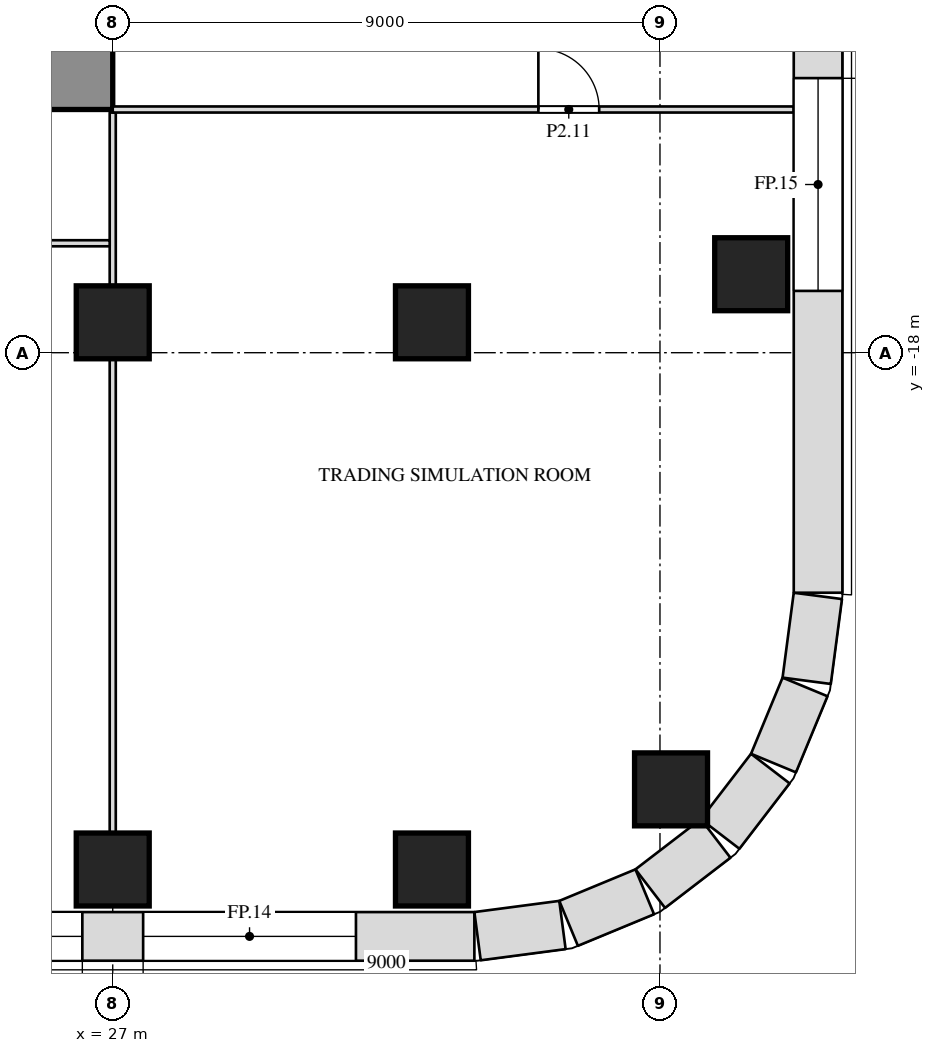
"""IFC4 building model, lengths in metres.
Left out: names, types, materials, properties, quantities, classifications, styles, units other than length and angle.
Written with IfcOpenShell. Run it as: python <this file> out.ifc"""

import sys

from ifc_helpers import new_model, si_unit, direction, frame, frame_2d, origin, origin_2d, place, context, subcontext, project, spatial, rectangle, extrude, element, fill, save


model = new_model("IFC4")
c1 = context("Model", 3, precision=1e-05, world=origin(), true_north=direction((0.0, 1.0)))
c2 = subcontext(c1, "Body", "Model", "MODEL_VIEW")
j1 = project(units=[si_unit("LENGTHUNIT", "METRE"), si_unit("PLANEANGLEUNIT", "RADIAN")], contexts=[c1])
p1 = place(None, origin())
s1 = spatial("IfcSite", under=j1, at=p1, CompositionType="ELEMENT")
p2 = place(p1, origin())
s2 = spatial("IfcBuilding", under=s1, at=p2, CompositionType="ELEMENT")
p3 = place(p2, frame((0.0, 0.0, 15.0)))
s3 = spatial("IfcBuildingStorey", under=s2, at=p3, CompositionType="ELEMENT", Elevation=15.0)
for number, where, z_axis, x_axis in (
    (1, (27.0, -26.5, 0.0), (0.0, 0.0, 1.0), (1.0, 0.0, 0.0)),
    (2, (32.25, -26.5, 0.0), (0.0, 0.0, 1.0), (1.0, 0.0, 0.0)),
    (3, (36.182, -25.182, 0.0), (0.0, 0.0, 1.0), (1.0, 0.0, 0.0)),
    (4, (27.0, -17.5, 0.0), (0.0, 0.0, 1.0), (1.0, 0.0, 0.0)),
    (5, (32.25, -17.5, 0.0), (0.0, 0.0, 1.0), (1.0, 0.0, 0.0)),
    (6, (37.5, -16.709, 0.0), (0.0, 0.0, 1.0), (1.0, 0.0, 0.0)),
):
    element("IfcColumn", number, at=place(p3, frame(where, z_axis=z_axis, x_axis=x_axis)), inside=s3, PredefinedType="COLUMN", context=c2, shape_type="SweptSolid", body=[
        extrude(rectangle(XDim=1.2, YDim=1.2, at=origin_2d()), origin(), (0.0, 0.0, 1.0), 6.0),
    ])
p4 = place(p3, frame((-27.0, -13.4, 0.0), z_axis=(0.0, 0.0, 1.0), x_axis=(1.0, 0.0, 0.0)))
e7 = element("IfcWall", 7, at=p4, inside=s3, PredefinedType="SHEAR", context=c2, shape_type="SweptSolid", body=[
    extrude(rectangle(XDim=54.0, YDim=1.2, at=frame_2d((27.0, 0.0))), origin(), (0.0, 0.0, 1.0), 5.7),
])
p5 = place(p4, frame((16.45, 0.0, 0.0)))
e8 = element("IfcOpeningElement", 8, at=p5, cuts=e7, PredefinedType="OPENING", context=c2, shape_type="SweptSolid", body=[
    extrude(rectangle(XDim=1.0, YDim=2.1, at=frame_2d((0.5, 1.05))), frame((0.0, 0.612, 0.0), z_axis=(0.0, -1.0, 0.0), x_axis=(1.0, 0.0, 0.0)), (0.0, 0.0, 1.0), 1.224),
])
p6 = place(p4, frame((36.55, 0.0, 0.0)))
e9 = element("IfcOpeningElement", 9, at=p6, cuts=e7, PredefinedType="OPENING", context=c2, shape_type="SweptSolid", body=[
    extrude(rectangle(XDim=1.0, YDim=2.1, at=frame_2d((0.5, 1.05))), frame((0.0, 0.612, 0.0), z_axis=(0.0, -1.0, 0.0), x_axis=(1.0, 0.0, 0.0)), (0.0, 0.0, 1.0), 1.224),
])
p7 = place(p3, frame((27.0, -25.9, 0.0), z_axis=(0.0, 0.0, 1.0), x_axis=(0.0, 1.0, 0.0)))
e10 = element("IfcWall", 10, at=p7, inside=s3, PredefinedType="PARTITIONING", context=c2, shape_type="SweptSolid", body=[
    extrude(rectangle(XDim=7.8, YDim=0.1, at=frame_2d((3.9, 0.0))), origin(), (0.0, 0.0, 1.0), 5.088),
])
p8 = place(p3, frame((27.0, -16.9, 0.0), z_axis=(0.0, 0.0, 1.0), x_axis=(0.0, 1.0, 0.0)))
e11 = element("IfcWall", 11, at=p8, inside=s3, PredefinedType="PARTITIONING", context=c2, shape_type="SweptSolid", body=[
    extrude(rectangle(XDim=2.85, YDim=0.1, at=frame_2d((1.425, 0.0))), origin(), (0.0, 0.0, 1.0), 5.088),
])
p9 = place(p3, frame((-26.95, -16.2, 0.0), z_axis=(0.0, 0.0, 1.0), x_axis=(1.0, 0.0, 0.0)))
e12 = element("IfcWall", 12, at=p9, inside=s3, PredefinedType="PARTITIONING", context=c2, shape_type="SweptSolid", body=[
    extrude(rectangle(XDim=53.9, YDim=0.1, at=frame_2d((26.95, 0.0))), origin(), (0.0, 0.0, 1.0), 5.7),
])
p10 = place(p9, frame((6.2, 0.0, 0.0)))
e13 = element("IfcOpeningElement", 13, at=p10, cuts=e12, PredefinedType="OPENING", context=c2, shape_type="SweptSolid", body=[
    extrude(rectangle(XDim=1.0, YDim=2.1, at=frame_2d((0.5, 1.05))), frame((0.0, 0.062, 0.0), z_axis=(0.0, -1.0, 0.0), x_axis=(1.0, 0.0, 0.0)), (0.0, 0.0, 1.0), 0.124),
])
p11 = place(p9, frame((15.2, 0.0, 0.0)))
e14 = element("IfcOpeningElement", 14, at=p11, cuts=e12, PredefinedType="OPENING", context=c2, shape_type="SweptSolid", body=[
    extrude(rectangle(XDim=1.0, YDim=2.1, at=frame_2d((0.5, 1.05))), frame((0.0, 0.062, 0.0), z_axis=(0.0, -1.0, 0.0), x_axis=(1.0, 0.0, 0.0)), (0.0, 0.0, 1.0), 0.124),
])
p12 = place(p9, frame((21.95, 0.0, 0.0)))
e15 = element("IfcOpeningElement", 15, at=p12, cuts=e12, PredefinedType="OPENING", context=c2, shape_type="SweptSolid", body=[
    extrude(rectangle(XDim=1.0, YDim=2.1, at=frame_2d((0.5, 1.05))), frame((0.0, 0.062, 0.0), z_axis=(0.0, -1.0, 0.0), x_axis=(1.0, 0.0, 0.0)), (0.0, 0.0, 1.0), 0.124),
])
p13 = place(p9, frame((30.95, 0.0, 0.0)))
e16 = element("IfcOpeningElement", 16, at=p13, cuts=e12, PredefinedType="OPENING", context=c2, shape_type="SweptSolid", body=[
    extrude(rectangle(XDim=1.0, YDim=2.1, at=frame_2d((0.5, 1.05))), frame((0.0, 0.062, 0.0), z_axis=(0.0, -1.0, 0.0), x_axis=(1.0, 0.0, 0.0)), (0.0, 0.0, 1.0), 0.124),
])
p14 = place(p9, frame((39.95, 0.0, 0.0)))
e17 = element("IfcOpeningElement", 17, at=p14, cuts=e12, PredefinedType="OPENING", context=c2, shape_type="SweptSolid", body=[
    extrude(rectangle(XDim=1.0, YDim=2.1, at=frame_2d((0.5, 1.05))), frame((0.0, 0.062, 0.0), z_axis=(0.0, -1.0, 0.0), x_axis=(1.0, 0.0, 0.0)), (0.0, 0.0, 1.0), 0.124),
])
p15 = place(p9, frame((48.95, 0.0, 0.0)))
e18 = element("IfcOpeningElement", 18, at=p15, cuts=e12, PredefinedType="OPENING", context=c2, shape_type="SweptSolid", body=[
    extrude(rectangle(XDim=1.0, YDim=2.1, at=frame_2d((0.5, 1.05))), frame((0.0, 0.062, 0.0), z_axis=(0.0, -1.0, 0.0), x_axis=(1.0, 0.0, 0.0)), (0.0, 0.0, 1.0), 0.124),
])
p16 = place(p3, frame((27.0, -14.0, 0.0), z_axis=(0.0, 0.0, 1.0), x_axis=(1.0, 0.0, 0.0)))
e19 = element("IfcWall", 19, at=p16, inside=s3, PredefinedType="PARTITIONING", context=c2, shape_type="SweptSolid", body=[
    extrude(rectangle(XDim=11.2, YDim=0.1, at=frame_2d((5.6, 0.0))), origin(), (0.0, 0.0, 1.0), 5.7),
])
p17 = place(p16, frame((7.0, 0.0, 0.0)))
e20 = element("IfcOpeningElement", 20, at=p17, cuts=e19, PredefinedType="OPENING", context=c2, shape_type="SweptSolid", body=[
    extrude(rectangle(XDim=1.0, YDim=2.1, at=frame_2d((0.5, 1.05))), frame((0.0, 0.062, 0.0), z_axis=(0.0, -1.0, 0.0), x_axis=(1.0, 0.0, 0.0)), (0.0, 0.0, 1.0), 0.124),
])
p18 = place(p3, frame((-32.948, -27.6, 0.0), z_axis=(0.0, 0.0, 1.0), x_axis=(1.0, 0.0, 0.0)))
e21 = element("IfcWall", 21, at=p18, inside=s3, PredefinedType="SOLIDWALL", context=c2, shape_type="SweptSolid", body=[
    extrude(rectangle(XDim=65.895, YDim=0.8, at=frame_2d((32.948, 0.0))), origin(), (0.0, 0.0, 1.0), 5.7),
])
p19 = place(p18, frame((1.948, 0.0, 1.0)))
e22 = element("IfcOpeningElement", 22, at=p19, cuts=e21, PredefinedType="OPENING", context=c2, shape_type="SweptSolid", body=[
    extrude(rectangle(XDim=3.5, YDim=4.0, at=frame_2d((1.75, 2.0))), frame((0.0, 0.412, 0.0), z_axis=(0.0, -1.0, 0.0), x_axis=(1.0, 0.0, 0.0)), (0.0, 0.0, 1.0), 0.824),
])
p20 = place(p18, frame((6.448, 0.0, 1.0)))
e23 = element("IfcOpeningElement", 23, at=p20, cuts=e21, PredefinedType="OPENING", context=c2, shape_type="SweptSolid", body=[
    extrude(rectangle(XDim=3.5, YDim=4.0, at=frame_2d((1.75, 2.0))), frame((0.0, 0.412, 0.0), z_axis=(0.0, -1.0, 0.0), x_axis=(1.0, 0.0, 0.0)), (0.0, 0.0, 1.0), 0.824),
])
p21 = place(p18, frame((10.948, 0.0, 1.0)))
e24 = element("IfcOpeningElement", 24, at=p21, cuts=e21, PredefinedType="OPENING", context=c2, shape_type="SweptSolid", body=[
    extrude(rectangle(XDim=3.5, YDim=4.0, at=frame_2d((1.75, 2.0))), frame((0.0, 0.412, 0.0), z_axis=(0.0, -1.0, 0.0), x_axis=(1.0, 0.0, 0.0)), (0.0, 0.0, 1.0), 0.824),
])
p22 = place(p18, frame((15.448, 0.0, 1.0)))
e25 = element("IfcOpeningElement", 25, at=p22, cuts=e21, PredefinedType="OPENING", context=c2, shape_type="SweptSolid", body=[
    extrude(rectangle(XDim=3.5, YDim=4.0, at=frame_2d((1.75, 2.0))), frame((0.0, 0.412, 0.0), z_axis=(0.0, -1.0, 0.0), x_axis=(1.0, 0.0, 0.0)), (0.0, 0.0, 1.0), 0.824),
])
p23 = place(p18, frame((19.948, 0.0, 1.0)))
e26 = element("IfcOpeningElement", 26, at=p23, cuts=e21, PredefinedType="OPENING", context=c2, shape_type="SweptSolid", body=[
    extrude(rectangle(XDim=3.5, YDim=4.0, at=frame_2d((1.75, 2.0))), frame((0.0, 0.412, 0.0), z_axis=(0.0, -1.0, 0.0), x_axis=(1.0, 0.0, 0.0)), (0.0, 0.0, 1.0), 0.824),
])
p24 = place(p18, frame((24.448, 0.0, 1.0)))
e27 = element("IfcOpeningElement", 27, at=p24, cuts=e21, PredefinedType="OPENING", context=c2, shape_type="SweptSolid", body=[
    extrude(rectangle(XDim=3.5, YDim=4.0, at=frame_2d((1.75, 2.0))), frame((0.0, 0.412, 0.0), z_axis=(0.0, -1.0, 0.0), x_axis=(1.0, 0.0, 0.0)), (0.0, 0.0, 1.0), 0.824),
])
p25 = place(p18, frame((28.948, 0.0, 1.0)))
e28 = element("IfcOpeningElement", 28, at=p25, cuts=e21, PredefinedType="OPENING", context=c2, shape_type="SweptSolid", body=[
    extrude(rectangle(XDim=3.5, YDim=4.0, at=frame_2d((1.75, 2.0))), frame((0.0, 0.412, 0.0), z_axis=(0.0, -1.0, 0.0), x_axis=(1.0, 0.0, 0.0)), (0.0, 0.0, 1.0), 0.824),
])
p26 = place(p18, frame((33.448, 0.0, 1.0)))
e29 = element("IfcOpeningElement", 29, at=p26, cuts=e21, PredefinedType="OPENING", context=c2, shape_type="SweptSolid", body=[
    extrude(rectangle(XDim=3.5, YDim=4.0, at=frame_2d((1.75, 2.0))), frame((0.0, 0.412, 0.0), z_axis=(0.0, -1.0, 0.0), x_axis=(1.0, 0.0, 0.0)), (0.0, 0.0, 1.0), 0.824),
])
p27 = place(p18, frame((37.948, 0.0, 1.0)))
e30 = element("IfcOpeningElement", 30, at=p27, cuts=e21, PredefinedType="OPENING", context=c2, shape_type="SweptSolid", body=[
    extrude(rectangle(XDim=3.5, YDim=4.0, at=frame_2d((1.75, 2.0))), frame((0.0, 0.412, 0.0), z_axis=(0.0, -1.0, 0.0), x_axis=(1.0, 0.0, 0.0)), (0.0, 0.0, 1.0), 0.824),
])
p28 = place(p18, frame((42.448, 0.0, 1.0)))
e31 = element("IfcOpeningElement", 31, at=p28, cuts=e21, PredefinedType="OPENING", context=c2, shape_type="SweptSolid", body=[
    extrude(rectangle(XDim=3.5, YDim=4.0, at=frame_2d((1.75, 2.0))), frame((0.0, 0.412, 0.0), z_axis=(0.0, -1.0, 0.0), x_axis=(1.0, 0.0, 0.0)), (0.0, 0.0, 1.0), 0.824),
])
p29 = place(p18, frame((46.948, 0.0, 1.0)))
e32 = element("IfcOpeningElement", 32, at=p29, cuts=e21, PredefinedType="OPENING", context=c2, shape_type="SweptSolid", body=[
    extrude(rectangle(XDim=3.5, YDim=4.0, at=frame_2d((1.75, 2.0))), frame((0.0, 0.412, 0.0), z_axis=(0.0, -1.0, 0.0), x_axis=(1.0, 0.0, 0.0)), (0.0, 0.0, 1.0), 0.824),
])
p30 = place(p18, frame((51.448, 0.0, 1.0)))
e33 = element("IfcOpeningElement", 33, at=p30, cuts=e21, PredefinedType="OPENING", context=c2, shape_type="SweptSolid", body=[
    extrude(rectangle(XDim=3.5, YDim=4.0, at=frame_2d((1.75, 2.0))), frame((0.0, 0.412, 0.0), z_axis=(0.0, -1.0, 0.0), x_axis=(1.0, 0.0, 0.0)), (0.0, 0.0, 1.0), 0.824),
])
p31 = place(p18, frame((55.948, 0.0, 1.0)))
e34 = element("IfcOpeningElement", 34, at=p31, cuts=e21, PredefinedType="OPENING", context=c2, shape_type="SweptSolid", body=[
    extrude(rectangle(XDim=3.5, YDim=4.0, at=frame_2d((1.75, 2.0))), frame((0.0, 0.412, 0.0), z_axis=(0.0, -1.0, 0.0), x_axis=(1.0, 0.0, 0.0)), (0.0, 0.0, 1.0), 0.824),
])
p32 = place(p18, frame((60.448, 0.0, 1.0)))
e35 = element("IfcOpeningElement", 35, at=p32, cuts=e21, PredefinedType="OPENING", context=c2, shape_type="SweptSolid", body=[
    extrude(rectangle(XDim=3.5, YDim=4.0, at=frame_2d((1.75, 2.0))), frame((0.0, 0.412, 0.0), z_axis=(0.0, -1.0, 0.0), x_axis=(1.0, 0.0, 0.0)), (0.0, 0.0, 1.0), 0.824),
])
p33 = place(p3, frame((33.0, -27.597, 0.0), z_axis=(0.0, 0.0, 1.0), x_axis=(0.99144603414, 0.130517283865, 0.0)))
e36 = element("IfcWall", 36, at=p33, inside=s3, PredefinedType="SOLIDWALL", context=c2, shape_type="SweptSolid", body=[
    extrude(rectangle(XDim=1.408, YDim=0.8, at=frame_2d((0.704, 0.0))), origin(), (0.0, 0.0, 1.0), 5.7),
])
p34 = place(p3, frame((34.497, -27.386, 0.0), z_axis=(0.0, 0.0, 1.0), x_axis=(0.923847774587, 0.38276009378, 0.0)))
e37 = element("IfcWall", 37, at=p34, inside=s3, PredefinedType="SOLIDWALL", context=c2, shape_type="SweptSolid", body=[
    extrude(rectangle(XDim=1.355, YDim=0.8, at=frame_2d((0.678, 0.0))), origin(), (0.0, 0.0, 1.0), 5.7),
])
for number, where, z_axis, x_axis in (
    (38, (35.84, -26.815, 0.0), (0.0, 0.0, 1.0), (0.793, 0.609, 0.0)),
    (39, (36.989, -25.916, 0.0), (0.0, 0.0, 1.0), (0.609, 0.793, 0.0)),
):
    element("IfcWall", number, at=place(p3, frame(where, z_axis=z_axis, x_axis=x_axis)), inside=s3, PredefinedType="SOLIDWALL", context=c2, shape_type="SweptSolid", body=[
        extrude(rectangle(XDim=1.356, YDim=0.8, at=frame_2d((0.678, 0.0))), origin(), (0.0, 0.0, 1.0), 5.7),
    ])
p35 = place(p3, frame((37.867, -24.75, 0.0), z_axis=(0.0, 0.0, 1.0), x_axis=(0.38276009378, 0.923847774587, 0.0)))
e40 = element("IfcWall", 40, at=p35, inside=s3, PredefinedType="SOLIDWALL", context=c2, shape_type="SweptSolid", body=[
    extrude(rectangle(XDim=1.355, YDim=0.8, at=frame_2d((0.678, 0.0))), origin(), (0.0, 0.0, 1.0), 5.7),
])
p36 = place(p3, frame((38.413, -23.396, 0.0), z_axis=(0.0, 0.0, 1.0), x_axis=(0.130517283865, 0.99144603414, 0.0)))
e41 = element("IfcWall", 41, at=p36, inside=s3, PredefinedType="SOLIDWALL", context=c2, shape_type="SweptSolid", body=[
    extrude(rectangle(XDim=1.408, YDim=0.8, at=frame_2d((0.704, 0.0))), origin(), (0.0, 0.0, 1.0), 5.7),
])
p37 = place(p3, frame((38.6, -21.948, 0.0), z_axis=(0.0, 0.0, 1.0), x_axis=(0.0, 1.0, 0.0)))
e42 = element("IfcWall", 42, at=p37, inside=s3, PredefinedType="SOLIDWALL", context=c2, shape_type="SweptSolid", body=[
    extrude(rectangle(XDim=35.895, YDim=0.8, at=frame_2d((17.948, 0.0))), origin(), (0.0, 0.0, 1.0), 5.7),
])
p38 = place(p37, frame((4.964, 0.0, 1.0)))
e43 = element("IfcOpeningElement", 43, at=p38, cuts=e42, PredefinedType="OPENING", context=c2, shape_type="SweptSolid", body=[
    extrude(rectangle(XDim=3.5, YDim=4.0, at=frame_2d((1.75, 2.0))), frame((0.0, 0.412, 0.0), z_axis=(0.0, -1.0, 0.0), x_axis=(1.0, 0.0, 0.0)), (0.0, 0.0, 1.0), 0.824),
])
p39 = place(p37, frame((9.458, 0.0, 1.0)))
e44 = element("IfcOpeningElement", 44, at=p39, cuts=e42, PredefinedType="OPENING", context=c2, shape_type="SweptSolid", body=[
    extrude(rectangle(XDim=3.5, YDim=4.0, at=frame_2d((1.75, 2.0))), frame((0.0, 0.412, 0.0), z_axis=(0.0, -1.0, 0.0), x_axis=(1.0, 0.0, 0.0)), (0.0, 0.0, 1.0), 0.824),
])
p40 = place(p37, frame((13.951, 0.0, 1.0)))
e45 = element("IfcOpeningElement", 45, at=p40, cuts=e42, PredefinedType="OPENING", context=c2, shape_type="SweptSolid", body=[
    extrude(rectangle(XDim=3.5, YDim=4.0, at=frame_2d((1.75, 2.0))), frame((0.0, 0.412, 0.0), z_axis=(0.0, -1.0, 0.0), x_axis=(1.0, 0.0, 0.0)), (0.0, 0.0, 1.0), 0.824),
])
p41 = place(p37, frame((18.444, 0.0, 1.0)))
e46 = element("IfcOpeningElement", 46, at=p41, cuts=e42, PredefinedType="OPENING", context=c2, shape_type="SweptSolid", body=[
    extrude(rectangle(XDim=3.5, YDim=4.0, at=frame_2d((1.75, 2.0))), frame((0.0, 0.412, 0.0), z_axis=(0.0, -1.0, 0.0), x_axis=(1.0, 0.0, 0.0)), (0.0, 0.0, 1.0), 0.824),
])
p42 = place(p37, frame((22.938, 0.0, 1.0)))
e47 = element("IfcOpeningElement", 47, at=p42, cuts=e42, PredefinedType="OPENING", context=c2, shape_type="SweptSolid", body=[
    extrude(rectangle(XDim=3.5, YDim=4.0, at=frame_2d((1.75, 2.0))), frame((0.0, 0.412, 0.0), z_axis=(0.0, -1.0, 0.0), x_axis=(1.0, 0.0, 0.0)), (0.0, 0.0, 1.0), 0.824),
])
p43 = place(p37, frame((27.431, 0.0, 1.0)))
e48 = element("IfcOpeningElement", 48, at=p43, cuts=e42, PredefinedType="OPENING", context=c2, shape_type="SweptSolid", body=[
    extrude(rectangle(XDim=3.5, YDim=4.0, at=frame_2d((1.75, 2.0))), frame((0.0, 0.412, 0.0), z_axis=(0.0, -1.0, 0.0), x_axis=(1.0, 0.0, 0.0)), (0.0, 0.0, 1.0), 0.824),
])
p44 = place(p17, origin())
e49 = element("IfcDoor", 49, at=p44, inside=s3, OperationType="SINGLE_SWING_LEFT", PredefinedType="DOOR", context=c2, shape_type="SweptSolid", body=[
    extrude(rectangle(XDim=1.0, YDim=2.1, at=frame_2d((0.5, 1.05))), frame((0.0, 0.025, 0.0), z_axis=(0.0, -1.0, 0.0), x_axis=(1.0, 0.0, 0.0)), (0.0, 0.0, 1.0), 0.05),
])
fill(e20, e49)
p45 = place(p31, origin())
e50 = element("IfcWindow", 50, at=p45, inside=s3, PartitioningType="SINGLE_PANEL", PredefinedType="WINDOW", context=c2, shape_type="SweptSolid", body=[
    extrude(rectangle(XDim=3.5, YDim=4.0, at=frame_2d((1.75, 2.0))), frame((0.0, 0.03, 0.0), z_axis=(0.0, -1.0, 0.0), x_axis=(1.0, 0.0, 0.0)), (0.0, 0.0, 1.0), 0.06),
])
fill(e34, e50)
p46 = place(p32, origin())
e51 = element("IfcWindow", 51, at=p46, inside=s3, PartitioningType="SINGLE_PANEL", PredefinedType="WINDOW", context=c2, shape_type="SweptSolid", body=[
    extrude(rectangle(XDim=3.5, YDim=4.0, at=frame_2d((1.75, 2.0))), frame((0.0, 0.03, 0.0), z_axis=(0.0, -1.0, 0.0), x_axis=(1.0, 0.0, 0.0)), (0.0, 0.0, 1.0), 0.06),
])
fill(e35, e51)
p47 = place(p38, origin())
e52 = element("IfcWindow", 52, at=p47, inside=s3, PartitioningType="SINGLE_PANEL", PredefinedType="WINDOW", context=c2, shape_type="SweptSolid", body=[
    extrude(rectangle(XDim=3.5, YDim=4.0, at=frame_2d((1.75, 2.0))), frame((0.0, 0.03, 0.0), z_axis=(0.0, -1.0, 0.0), x_axis=(1.0, 0.0, 0.0)), (0.0, 0.0, 1.0), 0.06),
])
fill(e43, e52)
save(model, sys.argv[1])
